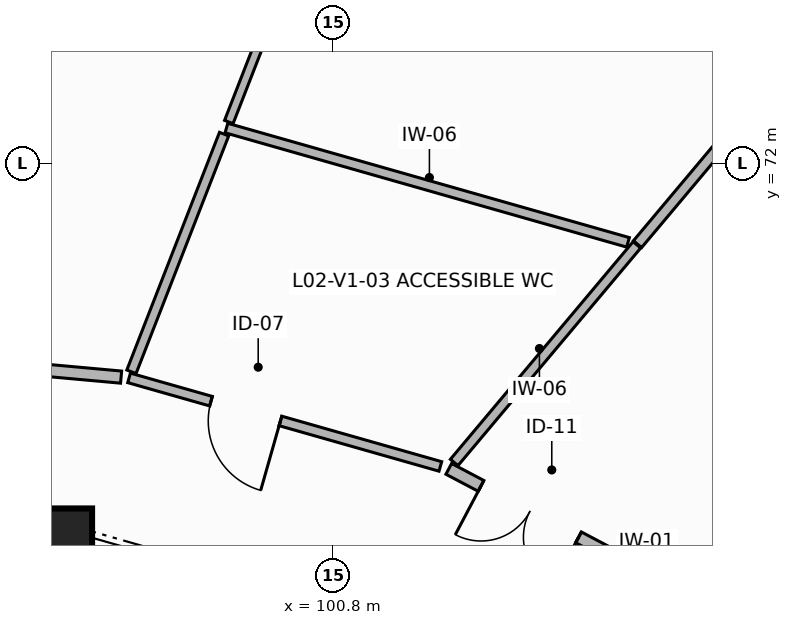
"""IFC4 building model, lengths in metres.
Left out: names, types, materials, properties, quantities, classifications, styles, units other than length and angle.
Written with IfcOpenShell. Run it as: python <this file> out.ifc"""

import sys

from ifc_helpers import new_model, si_unit, direction, frame, frame_2d, origin, origin_2d, place, context, subcontext, project, spatial, rectangle, extrude, element, fill, save


model = new_model("IFC4")
c1 = context("Model", 3, precision=1e-05, world=origin(), true_north=direction((0.0, 1.0)))
c2 = subcontext(c1, "Body", "Model", "MODEL_VIEW")
j1 = project(units=[si_unit("LENGTHUNIT", "METRE"), si_unit("PLANEANGLEUNIT", "RADIAN")], contexts=[c1])
p1 = place(None, origin())
s1 = spatial("IfcSite", under=j1, at=p1, CompositionType="ELEMENT")
p2 = place(p1, origin())
s2 = spatial("IfcBuilding", under=s1, at=p2, CompositionType="ELEMENT")
p3 = place(p2, frame((0.0, 0.0, 8.4)))
s3 = spatial("IfcBuildingStorey", under=s2, at=p3, CompositionType="ELEMENT", Elevation=8.4)
p4 = place(p3, frame((97.327, 67.163, 0.0), z_axis=(0.0, 0.0, 1.0), x_axis=(1.0, 0.0, 0.0)))
e1 = element("IfcColumn", 1, at=p4, inside=s3, PredefinedType="COLUMN", context=c2, shape_type="SweptSolid", body=[
    extrude(rectangle(XDim=0.6, YDim=0.6, at=origin_2d()), origin(), (0.0, 0.0, 1.0), 3.61),
])
p5 = place(p3, frame((105.932, 66.078, 0.0), z_axis=(0.0, 0.0, 1.0), x_axis=(-0.884408058246, 0.466714459289, 0.0)))
e2 = element("IfcWall", 2, at=p5, inside=s3, PredefinedType="PARTITIONING", context=c2, shape_type="SweptSolid", body=[
    extrude(rectangle(XDim=4.084, YDim=0.16, at=frame_2d((2.042, 0.0))), origin(), (0.0, 0.0, 1.0), 2.99),
])
p6 = place(p5, frame((2.154, 0.0, 0.0)))
e3 = element("IfcOpeningElement", 3, at=p6, cuts=e2, PredefinedType="OPENING", context=c2, shape_type="SweptSolid", body=[
    extrude(rectangle(XDim=1.45, YDim=2.25, at=frame_2d((0.725, 1.125))), frame((0.0, 0.09, 0.0), z_axis=(0.0, -1.0, 0.0), x_axis=(1.0, 0.0, 0.0)), (0.0, 0.0, 1.0), 0.18),
])
p7 = place(p3, frame((102.391, 68.068, 0.0), z_axis=(0.0, 0.0, 1.0), x_axis=(0.64304503453, 0.7658283643, 0.0)))
e4 = element("IfcWall", 4, at=p7, inside=s3, PredefinedType="PARTITIONING", context=c2, shape_type="SweptSolid", body=[
    extrude(rectangle(XDim=3.738, YDim=0.13, at=frame_2d((1.869, 0.0))), origin(), (0.0, 0.0, 1.0), 2.99),
])
p8 = place(p3, frame((104.803, 70.94, 0.0), z_axis=(0.0, 0.0, 1.0), x_axis=(0.6431052921, 0.765777763632, 0.0)))
e5 = element("IfcWall", 5, at=p8, inside=s3, PredefinedType="PARTITIONING", context=c2, shape_type="SweptSolid", body=[
    extrude(rectangle(XDim=7.125, YDim=0.14, at=frame_2d((3.562, 0.0))), origin(), (0.0, 0.0, 1.0), 2.99),
])
p9 = place(p3, frame((99.395, 72.468, 0.0), z_axis=(0.0, 0.0, 1.0), x_axis=(0.961788505004, -0.273793483563, 0.0)))
e6 = element("IfcWall", 6, at=p9, inside=s3, PredefinedType="PARTITIONING", context=c2, shape_type="SweptSolid", body=[
    extrude(rectangle(XDim=5.493, YDim=0.13, at=frame_2d((2.747, 0.0))), origin(), (0.0, 0.0, 1.0), 2.99),
])
p10 = place(p3, frame((102.209, 68.016, 0.0), z_axis=(0.0, 0.0, 1.0), x_axis=(-0.961845715117, 0.273592434676, 0.0)))
e7 = element("IfcWall", 7, at=p10, inside=s3, PredefinedType="PARTITIONING", context=c2, shape_type="SweptSolid", body=[
    extrude(rectangle(XDim=4.257, YDim=0.13, at=frame_2d((2.129, 0.0))), origin(), (0.0, 0.0, 1.0), 2.99),
])
p11 = place(p10, frame((2.187, 0.0, 0.0)))
e8 = element("IfcOpeningElement", 8, at=p11, cuts=e7, PredefinedType="OPENING", context=c2, shape_type="SweptSolid", body=[
    extrude(rectangle(XDim=0.95, YDim=2.1, at=frame_2d((0.475, 1.05))), frame((0.0, 0.075, 0.0), z_axis=(0.0, -1.0, 0.0), x_axis=(1.0, 0.0, 0.0)), (0.0, 0.0, 1.0), 0.15),
])
p12 = place(p3, frame((98.145, 69.261, 0.0), z_axis=(0.0, 0.0, 1.0), x_axis=(0.363211414965, 0.931706750024, 0.0)))
e9 = element("IfcWall", 9, at=p12, inside=s3, PredefinedType="PARTITIONING", context=c2, shape_type="SweptSolid", body=[
    extrude(rectangle(XDim=3.356, YDim=0.13, at=frame_2d((1.678, 0.0))), origin(), (0.0, 0.0, 1.0), 2.99),
])
p13 = place(p3, frame((101.76, 78.538, 0.0), z_axis=(0.0, 0.0, 1.0), x_axis=(-0.363008745281, -0.931785732264, 0.0)))
e10 = element("IfcWall", 10, at=p13, inside=s3, PredefinedType="PARTITIONING", context=c2, shape_type="SweptSolid", body=[
    extrude(rectangle(XDim=6.429, YDim=0.12, at=frame_2d((3.215, 0.0))), origin(), (0.0, 0.0, 1.0), 2.99),
])
p14 = place(p3, frame((98.009, 69.191, 0.0), z_axis=(0.0, 0.0, 1.0), x_axis=(-0.995926589216, 0.090167781902, 0.0)))
e11 = element("IfcWall", 11, at=p14, inside=s3, PredefinedType="PARTITIONING", context=c2, shape_type="SweptSolid", body=[
    extrude(rectangle(XDim=4.427, YDim=0.16, at=frame_2d((2.213, 0.0))), origin(), (0.0, 0.0, 1.0), 2.99),
])
p15 = place(p14, frame((1.72, 0.0, 0.0)))
e12 = element("IfcOpeningElement", 12, at=p15, cuts=e11, PredefinedType="OPENING", context=c2, shape_type="SweptSolid", body=[
    extrude(rectangle(XDim=1.4, YDim=2.3, at=frame_2d((0.7, 1.15))), frame((0.0, 0.09, 0.0), z_axis=(0.0, -1.0, 0.0), x_axis=(1.0, 0.0, 0.0)), (0.0, 0.0, 1.0), 0.18),
])
p16 = place(p6, origin())
e13 = element("IfcDoor", 13, at=p16, inside=s3, OperationType="DOUBLE_DOOR_SINGLE_SWING", PredefinedType="DOOR", context=c2, shape_type="SweptSolid", body=[
    extrude(rectangle(XDim=1.45, YDim=2.25, at=frame_2d((0.725, 1.125))), frame((0.0, 0.025, 0.0), z_axis=(0.0, -1.0, 0.0), x_axis=(1.0, 0.0, 0.0)), (0.0, 0.0, 1.0), 0.05),
])
fill(e3, e13)
p17 = place(p11, origin())
e14 = element("IfcDoor", 14, at=p17, inside=s3, OperationType="SINGLE_SWING_LEFT", PredefinedType="DOOR", context=c2, shape_type="SweptSolid", body=[
    extrude(rectangle(XDim=0.95, YDim=2.1, at=frame_2d((0.475, 1.05))), frame((0.0, 0.025, 0.0), z_axis=(0.0, -1.0, 0.0), x_axis=(1.0, 0.0, 0.0)), (0.0, 0.0, 1.0), 0.05),
])
fill(e8, e14)
save(model, sys.argv[1])
